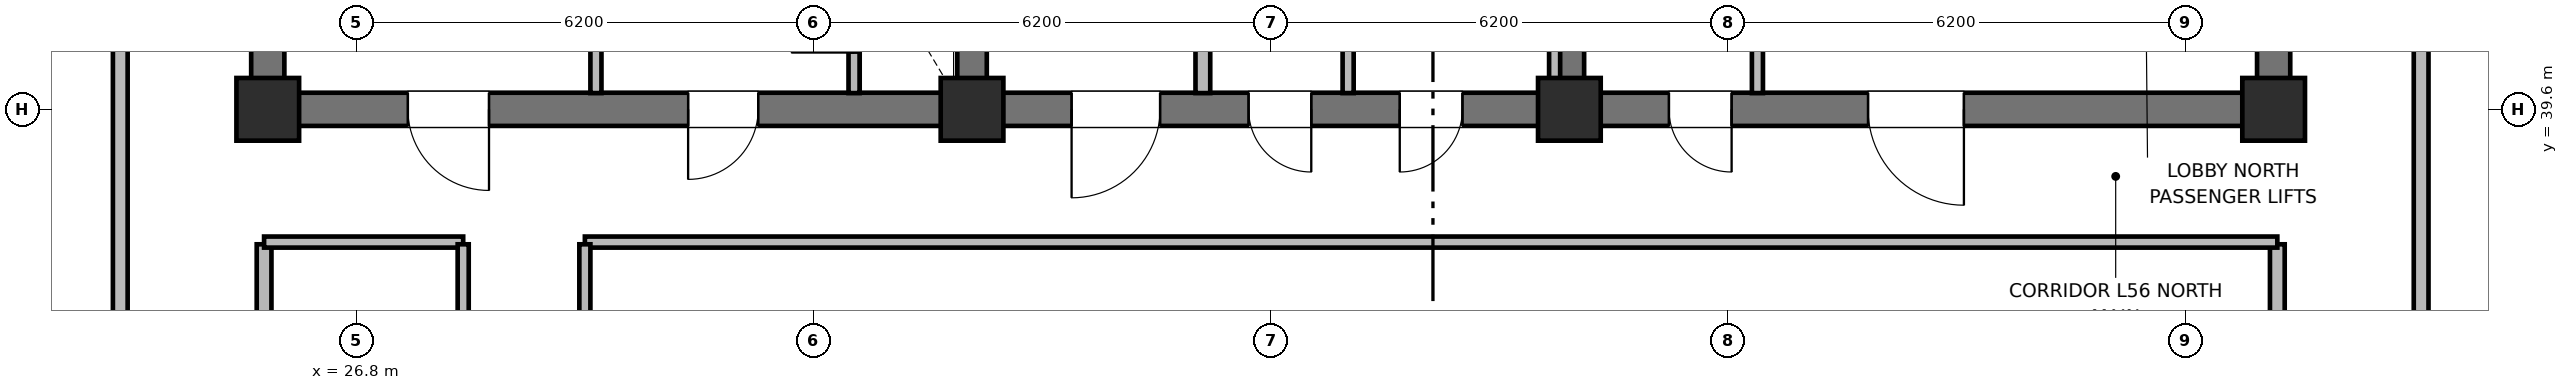
"""IFC4 building model, lengths in metres.
Left out: names, types, materials, properties, quantities, classifications, styles, units other than length and angle.
Written with IfcOpenShell. Run it as: python <this file> out.ifc"""

import sys

from ifc_helpers import new_model, si_unit, direction, frame, frame_2d, origin, origin_2d, place, context, subcontext, project, spatial, rectangle, extrude, element, fill, save


model = new_model("IFC4")
c1 = context("Model", 3, precision=1e-05, world=origin(), true_north=direction((0.0, 1.0)))
c2 = subcontext(c1, "Body", "Model", "MODEL_VIEW")
j1 = project(units=[si_unit("LENGTHUNIT", "METRE"), si_unit("PLANEANGLEUNIT", "RADIAN")], contexts=[c1])
p1 = place(None, origin())
s1 = spatial("IfcSite", under=j1, at=p1, CompositionType="ELEMENT")
p2 = place(p1, origin())
s2 = spatial("IfcBuilding", under=s1, at=p2, CompositionType="ELEMENT")
p3 = place(p2, frame((0.0, 0.0, 225.8)))
s3 = spatial("IfcBuildingStorey", under=s2, at=p3, CompositionType="ELEMENT", Elevation=225.8)
for number, where, z_axis, x_axis in (
    (1, (25.6, 39.825, 0.0), (0.0, 0.0, 1.0), (0.0, 1.0, 0.0)),
    (2, (52.8, 39.825, 0.0), (0.0, 0.0, 1.0), (0.0, 1.0, 0.0)),
):
    element("IfcWall", number, at=place(p3, frame(where, z_axis=z_axis, x_axis=x_axis)), inside=s3, PredefinedType="SHEAR", context=c2, shape_type="SweptSolid", body=[
        extrude(rectangle(XDim=5.75, YDim=0.45, at=frame_2d((2.875, 0.0))), origin(), (0.0, 0.0, 1.0), 3.7),
    ])
p4 = place(p3, frame((52.8, 39.6, 0.0), z_axis=(0.0, 0.0, 1.0), x_axis=(-1.0, 0.0, 0.0)))
e3 = element("IfcWall", 3, at=p4, inside=s3, PredefinedType="SHEAR", context=c2, shape_type="SweptSolid", body=[
    extrude(rectangle(XDim=27.2, YDim=0.45, at=frame_2d((13.6, 0.0))), origin(), (0.0, 0.0, 1.0), 3.7),
])
p5 = place(p4, frame((24.2, 0.0, 0.0)))
e4 = element("IfcOpeningElement", 4, at=p5, cuts=e3, PredefinedType="OPENING", context=c2, shape_type="SweptSolid", body=[
    extrude(rectangle(XDim=1.1, YDim=2.15, at=frame_2d((0.55, 1.075))), frame((0.0, 0.235, 0.0), z_axis=(0.0, -1.0, 0.0), x_axis=(1.0, 0.0, 0.0)), (0.0, 0.0, 1.0), 0.47),
])
p6 = place(p4, frame((20.55, 0.0, 0.0)))
e5 = element("IfcOpeningElement", 5, at=p6, cuts=e3, PredefinedType="OPENING", context=c2, shape_type="SweptSolid", body=[
    extrude(rectangle(XDim=0.95, YDim=2.1, at=frame_2d((0.475, 1.05))), frame((0.0, 0.235, 0.0), z_axis=(0.0, -1.0, 0.0), x_axis=(1.0, 0.0, 0.0)), (0.0, 0.0, 1.0), 0.47),
])
p7 = place(p4, frame((15.1, 0.0, 0.0)))
e6 = element("IfcOpeningElement", 6, at=p7, cuts=e3, PredefinedType="OPENING", context=c2, shape_type="SweptSolid", body=[
    extrude(rectangle(XDim=1.2, YDim=2.15, at=frame_2d((0.6, 1.075))), frame((0.0, 0.235, 0.0), z_axis=(0.0, -1.0, 0.0), x_axis=(1.0, 0.0, 0.0)), (0.0, 0.0, 1.0), 0.47),
])
p8 = place(p4, frame((13.05, 0.0, 0.0)))
e7 = element("IfcOpeningElement", 7, at=p8, cuts=e3, PredefinedType="OPENING", context=c2, shape_type="SweptSolid", body=[
    extrude(rectangle(XDim=0.85, YDim=2.1, at=frame_2d((0.425, 1.05))), frame((0.0, 0.235, 0.0), z_axis=(0.0, -1.0, 0.0), x_axis=(1.0, 0.0, 0.0)), (0.0, 0.0, 1.0), 0.47),
])
p9 = place(p4, frame((11.0, 0.0, 0.0)))
e8 = element("IfcOpeningElement", 8, at=p9, cuts=e3, PredefinedType="OPENING", context=c2, shape_type="SweptSolid", body=[
    extrude(rectangle(XDim=0.85, YDim=2.1, at=frame_2d((0.425, 1.05))), frame((0.0, 0.235, 0.0), z_axis=(0.0, -1.0, 0.0), x_axis=(1.0, 0.0, 0.0)), (0.0, 0.0, 1.0), 0.47),
])
p10 = place(p4, frame((7.35, 0.0, 0.0)))
e9 = element("IfcOpeningElement", 9, at=p10, cuts=e3, PredefinedType="OPENING", context=c2, shape_type="SweptSolid", body=[
    extrude(rectangle(XDim=0.85, YDim=2.1, at=frame_2d((0.425, 1.05))), frame((0.0, 0.235, 0.0), z_axis=(0.0, -1.0, 0.0), x_axis=(1.0, 0.0, 0.0)), (0.0, 0.0, 1.0), 0.47),
])
p11 = place(p4, frame((4.2, 0.0, 0.0)))
e10 = element("IfcOpeningElement", 10, at=p11, cuts=e3, PredefinedType="OPENING", context=c2, shape_type="SweptSolid", body=[
    extrude(rectangle(XDim=1.3, YDim=2.2, at=frame_2d((0.65, 1.1))), frame((0.0, 0.235, 0.0), z_axis=(0.0, -1.0, 0.0), x_axis=(1.0, 0.0, 0.0)), (0.0, 0.0, 1.0), 0.47),
])
for number, where, z_axis, x_axis in (
    (11, (35.15, 39.825, 0.0), (0.0, 0.0, 1.0), (0.0, 1.0, 0.0)),
    (12, (43.25, 39.825, 0.0), (0.0, 0.0, 1.0), (0.0, 1.0, 0.0)),
):
    element("IfcWall", number, at=place(p3, frame(where, z_axis=z_axis, x_axis=x_axis)), inside=s3, PredefinedType="SHEAR", context=c2, shape_type="SweptSolid", body=[
        extrude(rectangle(XDim=5.75, YDim=0.4, at=frame_2d((2.875, 0.0))), origin(), (0.0, 0.0, 1.0), 3.7),
    ])
for number, where, z_axis, x_axis in (
    (13, (25.6, 39.6, 0.0), (0.0, 0.0, 1.0), (1.0, 0.0, 0.0)),
    (14, (35.15, 39.6, 0.0), (0.0, 0.0, 1.0), (1.0, 0.0, 0.0)),
    (15, (43.25, 39.6, 0.0), (0.0, 0.0, 1.0), (1.0, 0.0, 0.0)),
    (16, (52.8, 39.6, 0.0), (0.0, 0.0, 1.0), (1.0, 0.0, 0.0)),
):
    element("IfcColumn", number, at=place(p3, frame(where, z_axis=z_axis, x_axis=x_axis)), inside=s3, PredefinedType="COLUMN", context=c2, shape_type="SweptSolid", body=[
        extrude(rectangle(XDim=0.85, YDim=0.85, at=origin_2d()), origin(), (0.0, 0.0, 1.0), 3.7),
    ])
p12 = place(p3, frame((33.55, 39.82, 0.0), z_axis=(0.0, 0.0, 1.0), x_axis=(0.0, 1.0, 0.0)))
e17 = element("IfcWall", 17, at=p12, inside=s3, PredefinedType="PARTITIONING", context=c2, shape_type="SweptSolid", body=[
    extrude(rectangle(XDim=2.13, YDim=0.15, at=frame_2d((1.065, 0.0))), origin(), (0.0, 0.0, 1.0), 2.56),
])
p13 = place(p12, frame((0.55, 0.0, 0.0)))
e18 = element("IfcOpeningElement", 18, at=p13, cuts=e17, PredefinedType="OPENING", context=c2, shape_type="SweptSolid", body=[
    extrude(rectangle(XDim=0.85, YDim=2.05, at=frame_2d((0.425, 1.025))), frame((0.0, 0.085, 0.0), z_axis=(0.0, -1.0, 0.0), x_axis=(1.0, 0.0, 0.0)), (0.0, 0.0, 1.0), 0.17),
])
p14 = place(p3, frame((30.05, 39.82, 0.0), z_axis=(0.0, 0.0, 1.0), x_axis=(0.0, 1.0, 0.0)))
e19 = element("IfcWall", 19, at=p14, inside=s3, PredefinedType="PARTITIONING", context=c2, shape_type="SweptSolid", body=[
    extrude(rectangle(XDim=2.13, YDim=0.15, at=frame_2d((1.065, 0.0))), origin(), (0.0, 0.0, 1.0), 2.56),
])
p15 = place(p3, frame((38.28, 39.82, 0.0), z_axis=(0.0, 0.0, 1.0), x_axis=(0.0, 1.0, 0.0)))
e20 = element("IfcWall", 20, at=p15, inside=s3, PredefinedType="PARTITIONING", context=c2, shape_type="SweptSolid", body=[
    extrude(rectangle(XDim=5.63, YDim=0.2, at=frame_2d((2.815, 0.0))), origin(), (0.0, 0.0, 1.0), 2.56),
])
for number, where, z_axis, x_axis in (
    (21, (43.05, 39.82, 0.0), (0.0, 0.0, 1.0), (0.0, 1.0, 0.0)),
    (22, (40.25, 39.82, 0.0), (0.0, 0.0, 1.0), (0.0, 1.0, 0.0)),
    (23, (45.8, 39.82, 0.0), (0.0, 0.0, 1.0), (0.0, 1.0, 0.0)),
):
    element("IfcWall", number, at=place(p3, frame(where, z_axis=z_axis, x_axis=x_axis)), inside=s3, PredefinedType="PARTITIONING", context=c2, shape_type="SweptSolid", body=[
        extrude(rectangle(XDim=5.63, YDim=0.15, at=frame_2d((2.815, 0.0))), origin(), (0.0, 0.0, 1.0), 2.56),
    ])
for number, where, z_axis, x_axis in (
    (24, (25.55, 18.63, 0.0), (0.0, 0.0, 1.0), (0.0, 1.0, 0.0)),
    (25, (52.85, 18.63, 0.0), (0.0, 0.0, 1.0), (0.0, 1.0, 0.0)),
):
    element("IfcWall", number, at=place(p3, frame(where, z_axis=z_axis, x_axis=x_axis)), inside=s3, PredefinedType="PARTITIONING", context=c2, shape_type="SweptSolid", body=[
        extrude(rectangle(XDim=19.14, YDim=0.2, at=frame_2d((9.57, 0.0))), origin(), (0.0, 0.0, 1.0), 2.56),
    ])
p16 = place(p3, frame((25.55, 37.8, 0.0), z_axis=(0.0, 0.0, 1.0), x_axis=(1.0, 0.0, 0.0)))
e26 = element("IfcWall", 26, at=p16, inside=s3, PredefinedType="PARTITIONING", context=c2, shape_type="SweptSolid", body=[
    extrude(rectangle(XDim=2.7, YDim=0.15, at=frame_2d((1.35, 0.0))), origin(), (0.0, 0.0, 1.0), 2.56),
])
p17 = place(p3, frame((29.9, 37.8, 0.0), z_axis=(0.0, 0.0, 1.0), x_axis=(1.0, 0.0, 0.0)))
e27 = element("IfcWall", 27, at=p17, inside=s3, PredefinedType="PARTITIONING", context=c2, shape_type="SweptSolid", body=[
    extrude(rectangle(XDim=22.95, YDim=0.15, at=frame_2d((11.475, 0.0))), origin(), (0.0, 0.0, 1.0), 2.56),
])
p18 = place(p3, frame((28.25, 18.63, 0.0), z_axis=(0.0, 0.0, 1.0), x_axis=(0.0, 1.0, 0.0)))
e28 = element("IfcWall", 28, at=p18, inside=s3, PredefinedType="PARTITIONING", context=c2, shape_type="SweptSolid", body=[
    extrude(rectangle(XDim=19.14, YDim=0.15, at=frame_2d((9.57, 0.0))), origin(), (0.0, 0.0, 1.0), 2.56),
])
p19 = place(p18, frame((3.0, 0.0, 0.0)))
e29 = element("IfcOpeningElement", 29, at=p19, cuts=e28, PredefinedType="OPENING", context=c2, shape_type="SweptSolid", body=[
    extrude(rectangle(XDim=0.9, YDim=2.1, at=frame_2d((0.45, 1.05))), frame((0.0, 0.085, 0.0), z_axis=(0.0, -1.0, 0.0), x_axis=(1.0, 0.0, 0.0)), (0.0, 0.0, 1.0), 0.17),
])
p20 = place(p18, frame((11.5, 0.0, 0.0)))
e30 = element("IfcOpeningElement", 30, at=p20, cuts=e28, PredefinedType="OPENING", context=c2, shape_type="SweptSolid", body=[
    extrude(rectangle(XDim=0.9, YDim=2.1, at=frame_2d((0.45, 1.05))), frame((0.0, 0.085, 0.0), z_axis=(0.0, -1.0, 0.0), x_axis=(1.0, 0.0, 0.0)), (0.0, 0.0, 1.0), 0.17),
])
p21 = place(p3, frame((29.9, 18.63, 0.0), z_axis=(0.0, 0.0, 1.0), x_axis=(0.0, 1.0, 0.0)))
e31 = element("IfcWall", 31, at=p21, inside=s3, PredefinedType="PARTITIONING", context=c2, shape_type="SweptSolid", body=[
    extrude(rectangle(XDim=19.14, YDim=0.15, at=frame_2d((9.57, 0.0))), origin(), (0.0, 0.0, 1.0), 2.56),
])
p22 = place(p21, frame((2.4, 0.0, 0.0)))
e32 = element("IfcOpeningElement", 32, at=p22, cuts=e31, PredefinedType="OPENING", context=c2, shape_type="SweptSolid", body=[
    extrude(rectangle(XDim=1.0, YDim=2.15, at=frame_2d((0.5, 1.075))), frame((0.0, 0.085, 0.0), z_axis=(0.0, -1.0, 0.0), x_axis=(1.0, 0.0, 0.0)), (0.0, 0.0, 1.0), 0.17),
])
p23 = place(p21, frame((8.89, 0.0, 0.0)))
e33 = element("IfcOpeningElement", 33, at=p23, cuts=e31, PredefinedType="OPENING", context=c2, shape_type="SweptSolid", body=[
    extrude(rectangle(XDim=1.0, YDim=2.15, at=frame_2d((0.5, 1.075))), frame((0.0, 0.085, 0.0), z_axis=(0.0, -1.0, 0.0), x_axis=(1.0, 0.0, 0.0)), (0.0, 0.0, 1.0), 0.17),
])
p24 = place(p3, frame((23.6, 9.95, 0.0), z_axis=(0.0, 0.0, 1.0), x_axis=(0.0, 1.0, 0.0)))
e34 = element("IfcWall", 34, at=p24, inside=s3, PredefinedType="PARTITIONING", context=c2, shape_type="SweptSolid", body=[
    extrude(rectangle(XDim=36.5, YDim=0.2, at=frame_2d((18.25, 0.0))), origin(), (0.0, 0.0, 1.0), 2.56),
])
p25 = place(p24, frame((3.25, 0.0, 0.0)))
e35 = element("IfcOpeningElement", 35, at=p25, cuts=e34, PredefinedType="OPENING", context=c2, shape_type="SweptSolid", body=[
    extrude(rectangle(XDim=1.0, YDim=2.15, at=frame_2d((0.5, 1.075))), frame((0.0, 0.11, 0.0), z_axis=(0.0, -1.0, 0.0), x_axis=(1.0, 0.0, 0.0)), (0.0, 0.0, 1.0), 0.22),
])
p26 = place(p3, frame((54.8, 9.95, 0.0), z_axis=(0.0, 0.0, 1.0), x_axis=(0.0, 1.0, 0.0)))
e36 = element("IfcWall", 36, at=p26, inside=s3, PredefinedType="PARTITIONING", context=c2, shape_type="SweptSolid", body=[
    extrude(rectangle(XDim=36.5, YDim=0.2, at=frame_2d((18.25, 0.0))), origin(), (0.0, 0.0, 1.0), 2.56),
])
p27 = place(p26, frame((3.25, 0.0, 0.0)))
e37 = element("IfcOpeningElement", 37, at=p27, cuts=e36, PredefinedType="OPENING", context=c2, shape_type="SweptSolid", body=[
    extrude(rectangle(XDim=1.0, YDim=2.15, at=frame_2d((0.5, 1.075))), frame((0.0, 0.11, 0.0), z_axis=(0.0, -1.0, 0.0), x_axis=(1.0, 0.0, 0.0)), (0.0, 0.0, 1.0), 0.22),
])
p28 = place(p26, frame((14.25, 0.0, 0.0)))
e38 = element("IfcOpeningElement", 38, at=p28, cuts=e36, PredefinedType="OPENING", context=c2, shape_type="SweptSolid", body=[
    extrude(rectangle(XDim=1.0, YDim=2.15, at=frame_2d((0.5, 1.075))), frame((0.0, 0.11, 0.0), z_axis=(0.0, -1.0, 0.0), x_axis=(1.0, 0.0, 0.0)), (0.0, 0.0, 1.0), 0.22),
])
p29 = place(p13, origin())
e39 = element("IfcDoor", 39, at=p29, inside=s3, OperationType="SINGLE_SWING_LEFT", PredefinedType="TRAPDOOR", context=c2, shape_type="SweptSolid", body=[
    extrude(rectangle(XDim=0.85, YDim=2.05, at=frame_2d((0.425, 1.025))), frame((0.0, 0.025, 0.0), z_axis=(0.0, -1.0, 0.0), x_axis=(1.0, 0.0, 0.0)), (0.0, 0.0, 1.0), 0.05),
])
fill(e18, e39)
p30 = place(p5, origin())
e40 = element("IfcDoor", 40, at=p30, inside=s3, OperationType="SINGLE_SWING_LEFT", PredefinedType="DOOR", context=c2, shape_type="SweptSolid", body=[
    extrude(rectangle(XDim=1.1, YDim=2.15, at=frame_2d((0.55, 1.075))), frame((0.0, 0.025, 0.0), z_axis=(0.0, -1.0, 0.0), x_axis=(1.0, 0.0, 0.0)), (0.0, 0.0, 1.0), 0.05),
])
fill(e4, e40)
p31 = place(p6, origin())
e41 = element("IfcDoor", 41, at=p31, inside=s3, OperationType="SINGLE_SWING_RIGHT", PredefinedType="DOOR", context=c2, shape_type="SweptSolid", body=[
    extrude(rectangle(XDim=0.95, YDim=2.1, at=frame_2d((0.475, 1.05))), frame((0.0, 0.025, 0.0), z_axis=(0.0, -1.0, 0.0), x_axis=(1.0, 0.0, 0.0)), (0.0, 0.0, 1.0), 0.05),
])
fill(e5, e41)
p32 = place(p7, origin())
e42 = element("IfcDoor", 42, at=p32, inside=s3, OperationType="SINGLE_SWING_RIGHT", PredefinedType="DOOR", context=c2, shape_type="SweptSolid", body=[
    extrude(rectangle(XDim=1.2, YDim=2.15, at=frame_2d((0.6, 1.075))), frame((0.0, 0.025, 0.0), z_axis=(0.0, -1.0, 0.0), x_axis=(1.0, 0.0, 0.0)), (0.0, 0.0, 1.0), 0.05),
])
fill(e6, e42)
p33 = place(p8, origin())
e43 = element("IfcDoor", 43, at=p33, inside=s3, OperationType="SINGLE_SWING_LEFT", PredefinedType="DOOR", context=c2, shape_type="SweptSolid", body=[
    extrude(rectangle(XDim=0.85, YDim=2.1, at=frame_2d((0.425, 1.05))), frame((0.0, 0.025, 0.0), z_axis=(0.0, -1.0, 0.0), x_axis=(1.0, 0.0, 0.0)), (0.0, 0.0, 1.0), 0.05),
])
fill(e7, e43)
p34 = place(p9, origin())
e44 = element("IfcDoor", 44, at=p34, inside=s3, OperationType="SINGLE_SWING_RIGHT", PredefinedType="DOOR", context=c2, shape_type="SweptSolid", body=[
    extrude(rectangle(XDim=0.85, YDim=2.1, at=frame_2d((0.425, 1.05))), frame((0.0, 0.025, 0.0), z_axis=(0.0, -1.0, 0.0), x_axis=(1.0, 0.0, 0.0)), (0.0, 0.0, 1.0), 0.05),
])
fill(e8, e44)
p35 = place(p10, origin())
e45 = element("IfcDoor", 45, at=p35, inside=s3, OperationType="SINGLE_SWING_LEFT", PredefinedType="DOOR", context=c2, shape_type="SweptSolid", body=[
    extrude(rectangle(XDim=0.85, YDim=2.1, at=frame_2d((0.425, 1.05))), frame((0.0, 0.025, 0.0), z_axis=(0.0, -1.0, 0.0), x_axis=(1.0, 0.0, 0.0)), (0.0, 0.0, 1.0), 0.05),
])
fill(e9, e45)
p36 = place(p11, origin())
e46 = element("IfcDoor", 46, at=p36, inside=s3, OperationType="SINGLE_SWING_LEFT", PredefinedType="DOOR", context=c2, shape_type="SweptSolid", body=[
    extrude(rectangle(XDim=1.3, YDim=2.2, at=frame_2d((0.65, 1.1))), frame((0.0, 0.025, 0.0), z_axis=(0.0, -1.0, 0.0), x_axis=(1.0, 0.0, 0.0)), (0.0, 0.0, 1.0), 0.05),
])
fill(e10, e46)
save(model, sys.argv[1])
